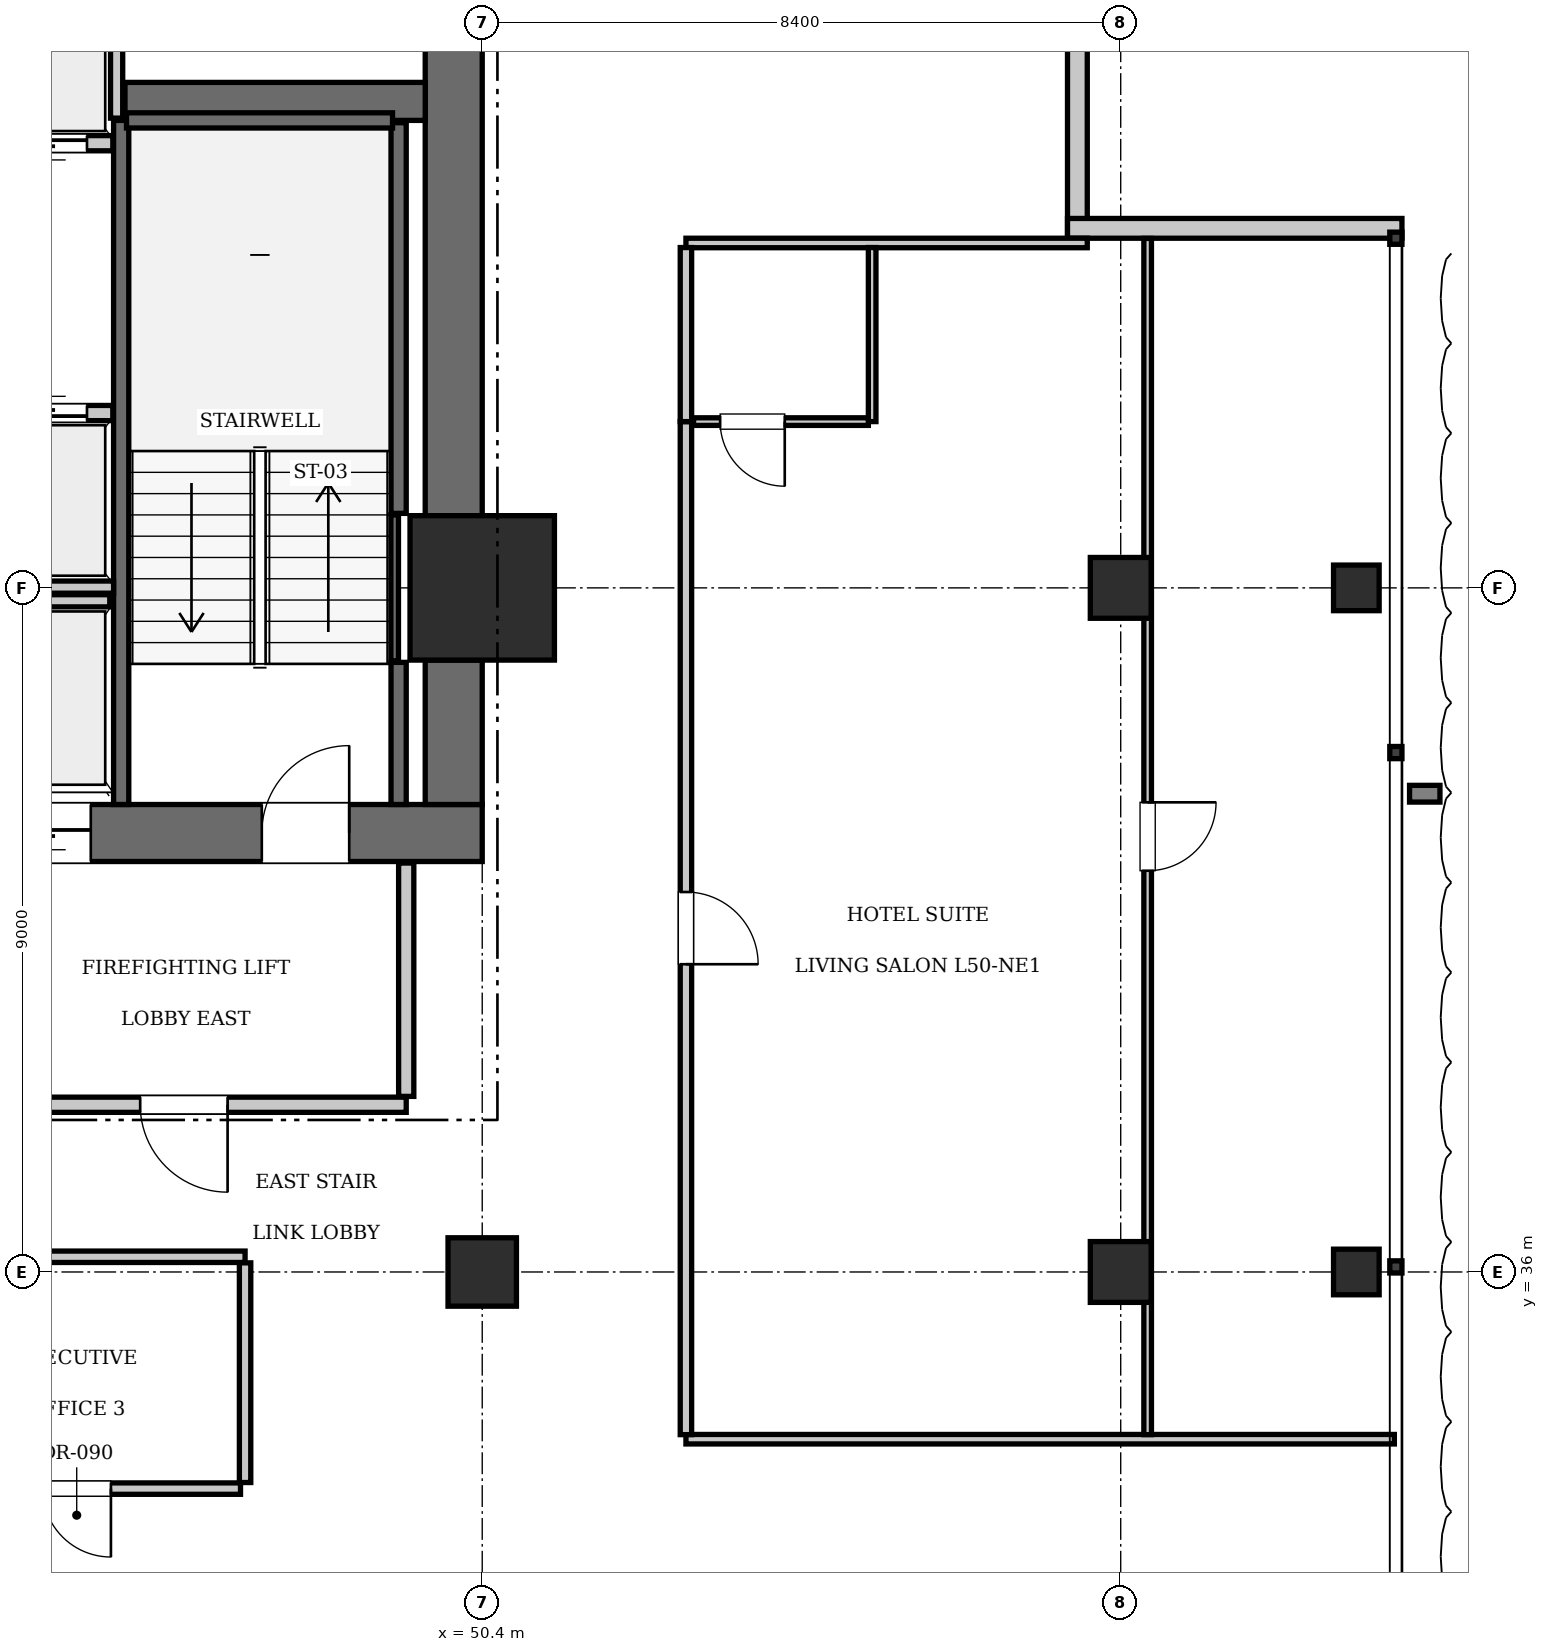
"""IFC4 building model, lengths in metres.
Left out: names, types, materials, properties, quantities, classifications, styles, units other than length and angle.
Written with IfcOpenShell. Run it as: python <this file> out.ifc"""

import sys

from ifc_helpers import new_model, si_unit, direction, frame, frame_2d, origin, origin_2d, place, context, subcontext, project, spatial, rectangle, i_section, extrude, element, fill, save


model = new_model("IFC4")
c1 = context("Model", 3, precision=1e-05, world=origin(), true_north=direction((0.0, 1.0)))
c2 = subcontext(c1, "Body", "Model", "MODEL_VIEW")
j1 = project(units=[si_unit("LENGTHUNIT", "METRE"), si_unit("PLANEANGLEUNIT", "RADIAN")], contexts=[c1])
p1 = place(None, origin())
s1 = spatial("IfcSite", under=j1, at=p1, CompositionType="ELEMENT")
p2 = place(p1, origin())
s2 = spatial("IfcBuilding", under=s1, at=p2, CompositionType="ELEMENT")
p3 = place(p2, frame((0.0, 0.0, 204.4)))
s3 = spatial("IfcBuildingStorey", under=s2, at=p3, CompositionType="ELEMENT", Elevation=204.4)
p4 = place(p3, frame((50.4, 45.0, 0.0), z_axis=(0.0, 0.0, 1.0), x_axis=(1.0, 0.0, 0.0)))
e1 = element("IfcColumn", 1, at=p4, inside=s3, PredefinedType="COLUMN", context=c2, shape_type="SweptSolid", body=[
    extrude(rectangle(XDim=1.9, YDim=1.9, at=origin_2d()), origin(), (0.0, 0.0, 1.0), 3.85),
])
p5 = place(p3, frame((43.6, 41.775, 0.0), z_axis=(0.0, 0.0, 1.0), x_axis=(1.0, 0.0, 0.0)))
e2 = element("IfcWall", 2, at=p5, inside=s3, PredefinedType="SHEAR", context=c2, shape_type="SweptSolid", body=[
    extrude(rectangle(XDim=6.8, YDim=0.75, at=frame_2d((3.4, 0.0))), origin(), (0.0, 0.0, 1.0), 3.85),
])
p6 = place(p5, frame((3.9, 0.0, 0.0)))
e3 = element("IfcOpeningElement", 3, at=p6, cuts=e2, PredefinedType="OPENING", context=c2, shape_type="SweptSolid", body=[
    extrude(rectangle(XDim=1.15, YDim=2.15, at=frame_2d((0.575, 1.075))), frame((0.0, 0.385, 0.0), z_axis=(0.0, -1.0, 0.0), x_axis=(1.0, 0.0, 0.0)), (0.0, 0.0, 1.0), 0.77),
])
p7 = place(p5, frame((0.55, 0.0, 0.0)))
e4 = element("IfcOpeningElement", 4, at=p7, cuts=e2, PredefinedType="OPENING", context=c2, shape_type="SweptSolid", body=[
    extrude(rectangle(XDim=1.1, YDim=2.2, at=frame_2d((0.55, 1.1))), frame((0.0, 0.385, 0.0), z_axis=(0.0, -1.0, 0.0), x_axis=(1.0, 0.0, 0.0)), (0.0, 0.0, 1.0), 0.77),
])
p8 = place(p3, frame((50.025, 42.15, 0.0), z_axis=(0.0, 0.0, 1.0), x_axis=(0.0, 1.0, 0.0)))
e5 = element("IfcWall", 5, at=p8, inside=s3, PredefinedType="SHEAR", context=c2, shape_type="SweptSolid", body=[
    extrude(rectangle(XDim=1.9, YDim=0.75, at=frame_2d((0.95, 0.0))), origin(), (0.0, 0.0, 1.0), 3.85),
])
p9 = place(p3, frame((50.025, 45.95, 0.0), z_axis=(0.0, 0.0, 1.0), x_axis=(0.0, 1.0, 0.0)))
e6 = element("IfcWall", 6, at=p9, inside=s3, PredefinedType="SHEAR", context=c2, shape_type="SweptSolid", body=[
    extrude(rectangle(XDim=7.3, YDim=0.75, at=frame_2d((3.65, 0.0))), origin(), (0.0, 0.0, 1.0), 3.85),
])
p10 = place(p3, frame((45.7, 51.4, 0.0), z_axis=(0.0, 0.0, 1.0), x_axis=(1.0, 0.0, 0.0)))
e7 = element("IfcWall", 7, at=p10, inside=s3, PredefinedType="SHEAR", context=c2, shape_type="SweptSolid", body=[
    extrude(rectangle(XDim=3.95, YDim=0.5, at=frame_2d((1.975, 0.0))), origin(), (0.0, 0.0, 1.0), 3.85),
])
p11 = place(p3, frame((50.4, 36.0, 0.0), z_axis=(0.0, 0.0, 1.0), x_axis=(1.0, 0.0, 0.0)))
e8 = element("IfcColumn", 8, at=p11, inside=s3, PredefinedType="COLUMN", context=c2, shape_type="SweptSolid", body=[
    extrude(rectangle(XDim=0.9, YDim=0.9, at=origin_2d()), origin(), (0.0, 0.0, 1.0), 3.85),
])
for number, where, z_axis, x_axis in (
    (9, (58.8, 36.0, 0.0), (0.0, 0.0, 1.0), (1.0, 0.0, 0.0)),
    (10, (58.8, 45.0, 0.0), (0.0, 0.0, 1.0), (1.0, 0.0, 0.0)),
):
    element("IfcColumn", number, at=place(p3, frame(where, z_axis=z_axis, x_axis=x_axis)), inside=s3, PredefinedType="COLUMN", context=c2, shape_type="SweptSolid", body=[
        extrude(rectangle(XDim=0.8, YDim=0.8, at=origin_2d()), origin(), (0.0, 0.0, 1.0), 3.85),
    ])
for number, where, z_axis, x_axis in (
    (11, (61.9, 36.0, 0.0), (0.0, 0.0, 1.0), (1.0, 0.0, 0.0)),
    (12, (61.9, 45.0, 0.0), (0.0, 0.0, 1.0), (1.0, 0.0, 0.0)),
):
    element("IfcColumn", number, at=place(p3, frame(where, z_axis=z_axis, x_axis=x_axis)), inside=s3, PredefinedType="COLUMN", context=c2, shape_type="SweptSolid", body=[
        extrude(i_section(OverallWidth=0.6, OverallDepth=0.6, WebThickness=0.025, FlangeThickness=0.038, at=origin_2d()), origin(), (0.0, 0.0, 1.0), 3.85),
    ])
p12 = place(p3, frame((45.65, 42.15, 0.0), z_axis=(0.0, 0.0, 1.0), x_axis=(0.0, 1.0, 0.0)))
e13 = element("IfcWall", 13, at=p12, inside=s3, PredefinedType="SOLIDWALL", context=c2, shape_type="SweptSolid", body=[
    extrude(rectangle(XDim=9.0, YDim=0.2, at=frame_2d((4.5, 0.0))), origin(), (0.0, 0.0, 1.0), 3.61),
])
p13 = place(p3, frame((49.3, 42.15, 0.0), z_axis=(0.0, 0.0, 1.0), x_axis=(0.0, 1.0, 0.0)))
e14 = element("IfcWall", 14, at=p13, inside=s3, PredefinedType="SOLIDWALL", context=c2, shape_type="SweptSolid", body=[
    extrude(rectangle(XDim=1.87, YDim=0.2, at=frame_2d((0.935, 0.0))), origin(), (0.0, 0.0, 1.0), 3.61),
])
p14 = place(p3, frame((49.3, 45.98, 0.0), z_axis=(0.0, 0.0, 1.0), x_axis=(0.0, 1.0, 0.0)))
e15 = element("IfcWall", 15, at=p14, inside=s3, PredefinedType="SOLIDWALL", context=c2, shape_type="SweptSolid", body=[
    extrude(rectangle(XDim=5.14, YDim=0.2, at=frame_2d((2.57, 0.0))), origin(), (0.0, 0.0, 1.0), 3.61),
])
p15 = place(p3, frame((45.72, 51.15, 0.0), z_axis=(0.0, 0.0, 1.0), x_axis=(1.0, 0.0, 0.0)))
e16 = element("IfcWall", 16, at=p15, inside=s3, PredefinedType="SOLIDWALL", context=c2, shape_type="SweptSolid", body=[
    extrude(rectangle(XDim=3.5, YDim=0.2, at=frame_2d((1.75, 0.0))), origin(), (0.0, 0.0, 1.0), 3.61),
])
p16 = place(p3, frame((49.248, 44.04, 0.0), z_axis=(0.0, 0.0, 1.0), x_axis=(0.0, 1.0, 0.0)))
e17 = element("IfcWall", 17, at=p16, inside=s3, PredefinedType="SOLIDWALL", context=c2, shape_type="SweptSolid", body=[
    extrude(rectangle(XDim=1.92, YDim=0.1, at=frame_2d((0.96, 0.0))), origin(), (0.0, 0.0, 1.0), 3.61),
])
p17 = place(p3, frame((43.86, 47.3, 0.0), z_axis=(0.0, 0.0, 1.0), x_axis=(1.0, 0.0, 0.0)))
e18 = element("IfcWall", 18, at=p17, inside=s3, PredefinedType="SOLIDWALL", context=c2, shape_type="SweptSolid", body=[
    extrude(rectangle(XDim=1.68, YDim=0.2, at=frame_2d((0.84, 0.0))), origin(), (0.0, 0.0, 1.0), 3.61),
])
p18 = place(p17, frame((0.34, 0.0, 0.0)))
e19 = element("IfcOpeningElement", 19, at=p18, cuts=e18, PredefinedType="OPENING", context=c2, shape_type="SweptSolid", body=[
    extrude(rectangle(XDim=1.0, YDim=2.15, at=frame_2d((0.5, 1.075))), frame((0.0, 0.11, 0.0), z_axis=(0.0, -1.0, 0.0), x_axis=(1.0, 0.0, 0.0)), (0.0, 0.0, 1.0), 0.22),
])
p19 = place(p3, frame((43.86, 50.85, 0.0), z_axis=(0.0, 0.0, 1.0), x_axis=(1.0, 0.0, 0.0)))
e20 = element("IfcWall", 20, at=p19, inside=s3, PredefinedType="SOLIDWALL", context=c2, shape_type="SweptSolid", body=[
    extrude(rectangle(XDim=1.68, YDim=0.2, at=frame_2d((0.84, 0.0))), origin(), (0.0, 0.0, 1.0), 3.61),
])
p20 = place(p19, frame((0.34, 0.0, 0.0)))
e21 = element("IfcOpeningElement", 21, at=p20, cuts=e20, PredefinedType="OPENING", context=c2, shape_type="SweptSolid", body=[
    extrude(rectangle(XDim=1.0, YDim=2.15, at=frame_2d((0.5, 1.075))), frame((0.0, 0.11, 0.0), z_axis=(0.0, -1.0, 0.0), x_axis=(1.0, 0.0, 0.0)), (0.0, 0.0, 1.0), 0.22),
])
p21 = place(p3, frame((43.9, 44.83, 0.0), z_axis=(0.0, 0.0, 1.0), x_axis=(1.0, 0.0, 0.0)))
e22 = element("IfcWall", 22, at=p21, inside=s3, PredefinedType="SOLIDWALL", context=c2, shape_type="SweptSolid", body=[
    extrude(rectangle(XDim=1.6, YDim=0.16, at=frame_2d((0.8, 0.0))), origin(), (0.0, 0.0, 1.0), 3.61),
])
p22 = place(p3, frame((42.1, 45.01, 0.0), z_axis=(0.0, 0.0, 1.0), x_axis=(1.0, 0.0, 0.0)))
e23 = element("IfcWall", 23, at=p22, inside=s3, PredefinedType="SOLIDWALL", context=c2, shape_type="SweptSolid", body=[
    extrude(rectangle(XDim=3.45, YDim=0.16, at=frame_2d((1.725, 0.0))), origin(), (0.0, 0.0, 1.0), 3.61),
])
p23 = place(p3, frame((45.59, 51.18, 0.0), z_axis=(0.0, 0.0, 1.0), x_axis=(0.0, 1.0, 0.0)))
e24 = element("IfcWall", 24, at=p23, inside=s3, PredefinedType="SOLIDWALL", context=c2, shape_type="SweptSolid", body=[
    extrude(rectangle(XDim=2.07, YDim=0.16, at=frame_2d((1.035, 0.0))), origin(), (0.0, 0.0, 1.0), 3.61),
])
for number, where, z_axis, x_axis in (
    (25, (58.23, 54.0, 0.0), (0.0, 0.0, 1.0), (0.0, -1.0, 0.0)),
    (26, (58.1, 49.73, 0.0), (0.0, 0.0, 1.0), (1.0, 0.0, 0.0)),
):
    element("IfcWall", number, at=place(p3, frame(where, z_axis=z_axis, x_axis=x_axis)), inside=s3, PredefinedType="SOLIDWALL", context=c2, shape_type="SweptSolid", body=[
        extrude(rectangle(XDim=4.4, YDim=0.26, at=frame_2d((2.2, 0.0))), origin(), (0.0, 0.0, 1.0), 3.61),
    ])
p24 = place(p3, frame((43.6, 38.2, 0.0), z_axis=(0.0, 0.0, 1.0), x_axis=(1.0, 0.0, 0.0)))
e27 = element("IfcWall", 27, at=p24, inside=s3, PredefinedType="PARTITIONING", context=c2, shape_type="SweptSolid", body=[
    extrude(rectangle(XDim=5.8, YDim=0.2, at=frame_2d((2.9, 0.0))), origin(), (0.0, 0.0, 1.0), 3.61),
])
p25 = place(p24, frame((2.3, 0.0, 0.0)))
e28 = element("IfcOpeningElement", 28, at=p25, cuts=e27, PredefinedType="OPENING", context=c2, shape_type="SweptSolid", body=[
    extrude(rectangle(XDim=1.15, YDim=2.15, at=frame_2d((0.575, 1.075))), frame((0.0, 0.11, 0.0), z_axis=(0.0, -1.0, 0.0), x_axis=(1.0, 0.0, 0.0)), (0.0, 0.0, 1.0), 0.22),
])
p26 = place(p3, frame((49.4, 38.31, 0.0), z_axis=(0.0, 0.0, 1.0), x_axis=(0.0, 1.0, 0.0)))
e29 = element("IfcWall", 29, at=p26, inside=s3, PredefinedType="PARTITIONING", context=c2, shape_type="SweptSolid", body=[
    extrude(rectangle(XDim=3.07, YDim=0.2, at=frame_2d((1.535, 0.0))), origin(), (0.0, 0.0, 1.0), 3.61),
])
p27 = place(p3, frame((42.85, 36.2, 0.0), z_axis=(0.0, 0.0, 1.0), x_axis=(1.0, 0.0, 0.0)))
e30 = element("IfcWall", 30, at=p27, inside=s3, PredefinedType="PARTITIONING", context=c2, shape_type="SweptSolid", body=[
    extrude(rectangle(XDim=4.43, YDim=0.15, at=frame_2d((2.215, 0.0))), origin(), (0.0, 0.0, 1.0), 3.61),
])
p28 = place(p3, frame((47.28, 33.23, 0.0), z_axis=(0.0, 0.0, 1.0), x_axis=(0.0, 1.0, 0.0)))
e31 = element("IfcWall", 31, at=p28, inside=s3, PredefinedType="PARTITIONING", context=c2, shape_type="SweptSolid", body=[
    extrude(rectangle(XDim=2.89, YDim=0.15, at=frame_2d((1.445, 0.0))), origin(), (0.0, 0.0, 1.0), 3.61),
])
p29 = place(p3, frame((42.91, 33.15, 0.0), z_axis=(0.0, 0.0, 1.0), x_axis=(1.0, 0.0, 0.0)))
e32 = element("IfcWall", 32, at=p29, inside=s3, PredefinedType="PARTITIONING", context=c2, shape_type="SweptSolid", body=[
    extrude(rectangle(XDim=4.31, YDim=0.15, at=frame_2d((2.155, 0.0))), origin(), (0.0, 0.0, 1.0), 3.61),
])
p30 = place(p29, frame((1.705, 0.0, 0.0)))
e33 = element("IfcOpeningElement", 33, at=p30, cuts=e32, PredefinedType="OPENING", context=c2, shape_type="SweptSolid", body=[
    extrude(rectangle(XDim=0.9, YDim=2.1, at=frame_2d((0.45, 1.05))), frame((0.0, 0.085, 0.0), z_axis=(0.0, -1.0, 0.0), x_axis=(1.0, 0.0, 0.0)), (0.0, 0.0, 1.0), 0.17),
])
p31 = place(p3, frame((53.08, 33.8, 0.0), z_axis=(0.0, 0.0, 1.0), x_axis=(1.0, 0.0, 0.0)))
e34 = element("IfcWall", 34, at=p31, inside=s3, PredefinedType="PARTITIONING", context=c2, shape_type="SweptSolid", body=[
    extrude(rectangle(XDim=9.32, YDim=0.125, at=frame_2d((4.66, 0.0))), origin(), (0.0, 0.0, 1.0), 3.61),
])
p32 = place(p3, frame((53.08, 49.538, 0.0), z_axis=(0.0, 0.0, 1.0), x_axis=(1.0, 0.0, 0.0)))
e35 = element("IfcWall", 35, at=p32, inside=s3, PredefinedType="PARTITIONING", context=c2, shape_type="SweptSolid", body=[
    extrude(rectangle(XDim=5.28, YDim=0.125, at=frame_2d((2.64, 0.0))), origin(), (0.0, 0.0, 1.0), 3.61),
])
p33 = place(p3, frame((53.08, 33.86, 0.0), z_axis=(0.0, 0.0, 1.0), x_axis=(0.0, 1.0, 0.0)))
e36 = element("IfcWall", 36, at=p33, inside=s3, PredefinedType="PARTITIONING", context=c2, shape_type="SweptSolid", body=[
    extrude(rectangle(XDim=13.327, YDim=0.15, at=frame_2d((6.664, 0.0))), origin(), (0.0, 0.0, 1.0), 3.61),
])
p34 = place(p33, frame((6.189, 0.0, 0.0)))
e37 = element("IfcOpeningElement", 37, at=p34, cuts=e36, PredefinedType="OPENING", context=c2, shape_type="SweptSolid", body=[
    extrude(rectangle(XDim=0.95, YDim=2.15, at=frame_2d((0.475, 1.075))), frame((0.0, 0.085, 0.0), z_axis=(0.0, -1.0, 0.0), x_axis=(1.0, 0.0, 0.0)), (0.0, 0.0, 1.0), 0.17),
])
p35 = place(p3, frame((53.08, 47.188, 0.0), z_axis=(0.0, 0.0, 1.0), x_axis=(0.0, 1.0, 0.0)))
e38 = element("IfcWall", 38, at=p35, inside=s3, PredefinedType="PARTITIONING", context=c2, shape_type="SweptSolid", body=[
    extrude(rectangle(XDim=2.29, YDim=0.15, at=frame_2d((1.145, 0.0))), origin(), (0.0, 0.0, 1.0), 3.61),
])
p36 = place(p3, frame((55.53, 47.188, 0.0), z_axis=(0.0, 0.0, 1.0), x_axis=(0.0, 1.0, 0.0)))
e39 = element("IfcWall", 39, at=p36, inside=s3, PredefinedType="PARTITIONING", context=c2, shape_type="SweptSolid", body=[
    extrude(rectangle(XDim=2.29, YDim=0.1, at=frame_2d((1.145, 0.0))), origin(), (0.0, 0.0, 1.0), 3.61),
])
p37 = place(p3, frame((53.18, 47.188, 0.0), z_axis=(0.0, 0.0, 1.0), x_axis=(1.0, 0.0, 0.0)))
e40 = element("IfcWall", 40, at=p37, inside=s3, PredefinedType="PARTITIONING", context=c2, shape_type="SweptSolid", body=[
    extrude(rectangle(XDim=2.3, YDim=0.1, at=frame_2d((1.15, 0.0))), origin(), (0.0, 0.0, 1.0), 3.61),
])
p38 = place(p37, frame((0.35, 0.0, 0.0)))
e41 = element("IfcOpeningElement", 41, at=p38, cuts=e40, PredefinedType="OPENING", context=c2, shape_type="SweptSolid", body=[
    extrude(rectangle(XDim=0.85, YDim=2.1, at=frame_2d((0.425, 1.05))), frame((0.0, 0.06, 0.0), z_axis=(0.0, -1.0, 0.0), x_axis=(1.0, 0.0, 0.0)), (0.0, 0.0, 1.0), 0.12),
])
p39 = place(p3, frame((59.154, 33.86, 0.0), z_axis=(0.0, 0.0, 1.0), x_axis=(0.0, 1.0, 0.0)))
e42 = element("IfcWall", 42, at=p39, inside=s3, PredefinedType="PARTITIONING", context=c2, shape_type="SweptSolid", body=[
    extrude(rectangle(XDim=15.737, YDim=0.1, at=frame_2d((7.869, 0.0))), origin(), (0.0, 0.0, 1.0), 3.61),
])
p40 = place(p39, frame((7.419, 0.0, 0.0)))
e43 = element("IfcOpeningElement", 43, at=p40, cuts=e42, PredefinedType="OPENING", context=c2, shape_type="SweptSolid", body=[
    extrude(rectangle(XDim=0.9, YDim=2.1, at=frame_2d((0.45, 1.05))), frame((0.0, 0.06, 0.0), z_axis=(0.0, -1.0, 0.0), x_axis=(1.0, 0.0, 0.0)), (0.0, 0.0, 1.0), 0.12),
])
p41 = place(p6, origin())
e44 = element("IfcDoor", 44, at=p41, inside=s3, OperationType="SINGLE_SWING_RIGHT", PredefinedType="DOOR", context=c2, shape_type="SweptSolid", body=[
    extrude(rectangle(XDim=1.15, YDim=2.15, at=frame_2d((0.575, 1.075))), frame((0.0, 0.025, 0.0), z_axis=(0.0, -1.0, 0.0), x_axis=(1.0, 0.0, 0.0)), (0.0, 0.0, 1.0), 0.05),
])
fill(e3, e44)
p42 = place(p18, origin())
e45 = element("IfcDoor", 45, at=p42, inside=s3, OperationType="SLIDING_TO_LEFT", PredefinedType="DOOR", context=c2, shape_type="SweptSolid", body=[
    extrude(rectangle(XDim=1.0, YDim=2.15, at=frame_2d((0.5, 1.075))), frame((0.0, 0.025, 0.0), z_axis=(0.0, -1.0, 0.0), x_axis=(1.0, 0.0, 0.0)), (0.0, 0.0, 1.0), 0.05),
])
fill(e19, e45)
p43 = place(p20, frame((1.0, 0.0, 0.0), z_axis=(0.0, 0.0, 1.0), x_axis=(-1.0, 0.0, 0.0)))
e46 = element("IfcDoor", 46, at=p43, inside=s3, OperationType="SLIDING_TO_LEFT", PredefinedType="DOOR", context=c2, shape_type="SweptSolid", body=[
    extrude(rectangle(XDim=1.0, YDim=2.15, at=frame_2d((0.5, 1.075))), frame((0.0, 0.025, 0.0), z_axis=(0.0, -1.0, 0.0), x_axis=(1.0, 0.0, 0.0)), (0.0, 0.0, 1.0), 0.05),
])
fill(e21, e46)
p44 = place(p7, frame((1.1, 0.0, 0.0), z_axis=(0.0, 0.0, 1.0), x_axis=(-1.0, 0.0, 0.0)))
e47 = element("IfcDoor", 47, at=p44, inside=s3, OperationType="SLIDING_TO_LEFT", PredefinedType="DOOR", context=c2, shape_type="SweptSolid", body=[
    extrude(rectangle(XDim=1.1, YDim=2.2, at=frame_2d((0.55, 1.1))), frame((0.0, 0.025, 0.0), z_axis=(0.0, -1.0, 0.0), x_axis=(1.0, 0.0, 0.0)), (0.0, 0.0, 1.0), 0.05),
])
fill(e4, e47)
p45 = place(p25, frame((1.15, 0.0, 0.0), z_axis=(0.0, 0.0, 1.0), x_axis=(-1.0, 0.0, 0.0)))
e48 = element("IfcDoor", 48, at=p45, inside=s3, OperationType="SINGLE_SWING_LEFT", PredefinedType="DOOR", context=c2, shape_type="SweptSolid", body=[
    extrude(rectangle(XDim=1.15, YDim=2.15, at=frame_2d((0.575, 1.075))), frame((0.0, 0.025, 0.0), z_axis=(0.0, -1.0, 0.0), x_axis=(1.0, 0.0, 0.0)), (0.0, 0.0, 1.0), 0.05),
])
fill(e28, e48)
p46 = place(p30, frame((0.9, 0.0, 0.0), z_axis=(0.0, 0.0, 1.0), x_axis=(-1.0, 0.0, 0.0)))
e49 = element("IfcDoor", 49, at=p46, inside=s3, OperationType="SINGLE_SWING_LEFT", PredefinedType="DOOR", context=c2, shape_type="SweptSolid", body=[
    extrude(rectangle(XDim=0.9, YDim=2.1, at=frame_2d((0.45, 1.05))), frame((0.0, 0.025, 0.0), z_axis=(0.0, -1.0, 0.0), x_axis=(1.0, 0.0, 0.0)), (0.0, 0.0, 1.0), 0.05),
])
fill(e33, e49)
p47 = place(p38, frame((0.85, 0.0, 0.0), z_axis=(0.0, 0.0, 1.0), x_axis=(-1.0, 0.0, 0.0)))
e50 = element("IfcDoor", 50, at=p47, inside=s3, OperationType="SINGLE_SWING_LEFT", PredefinedType="DOOR", context=c2, shape_type="SweptSolid", body=[
    extrude(rectangle(XDim=0.85, YDim=2.1, at=frame_2d((0.425, 1.05))), frame((0.0, 0.025, 0.0), z_axis=(0.0, -1.0, 0.0), x_axis=(1.0, 0.0, 0.0)), (0.0, 0.0, 1.0), 0.05),
])
fill(e41, e50)
p48 = place(p34, frame((0.95, 0.0, 0.0), z_axis=(0.0, 0.0, 1.0), x_axis=(-1.0, 0.0, 0.0)))
e51 = element("IfcDoor", 51, at=p48, inside=s3, OperationType="SINGLE_SWING_RIGHT", PredefinedType="DOOR", context=c2, shape_type="SweptSolid", body=[
    extrude(rectangle(XDim=0.95, YDim=2.15, at=frame_2d((0.475, 1.075))), frame((0.0, 0.025, 0.0), z_axis=(0.0, -1.0, 0.0), x_axis=(1.0, 0.0, 0.0)), (0.0, 0.0, 1.0), 0.05),
])
fill(e37, e51)
p49 = place(p40, frame((0.9, 0.0, 0.0), z_axis=(0.0, 0.0, 1.0), x_axis=(-1.0, 0.0, 0.0)))
e52 = element("IfcDoor", 52, at=p49, inside=s3, OperationType="SINGLE_SWING_LEFT", PredefinedType="DOOR", context=c2, shape_type="SweptSolid", body=[
    extrude(rectangle(XDim=0.9, YDim=2.1, at=frame_2d((0.45, 1.05))), frame((0.0, 0.025, 0.0), z_axis=(0.0, -1.0, 0.0), x_axis=(1.0, 0.0, 0.0)), (0.0, 0.0, 1.0), 0.05),
])
fill(e43, e52)
save(model, sys.argv[1])
